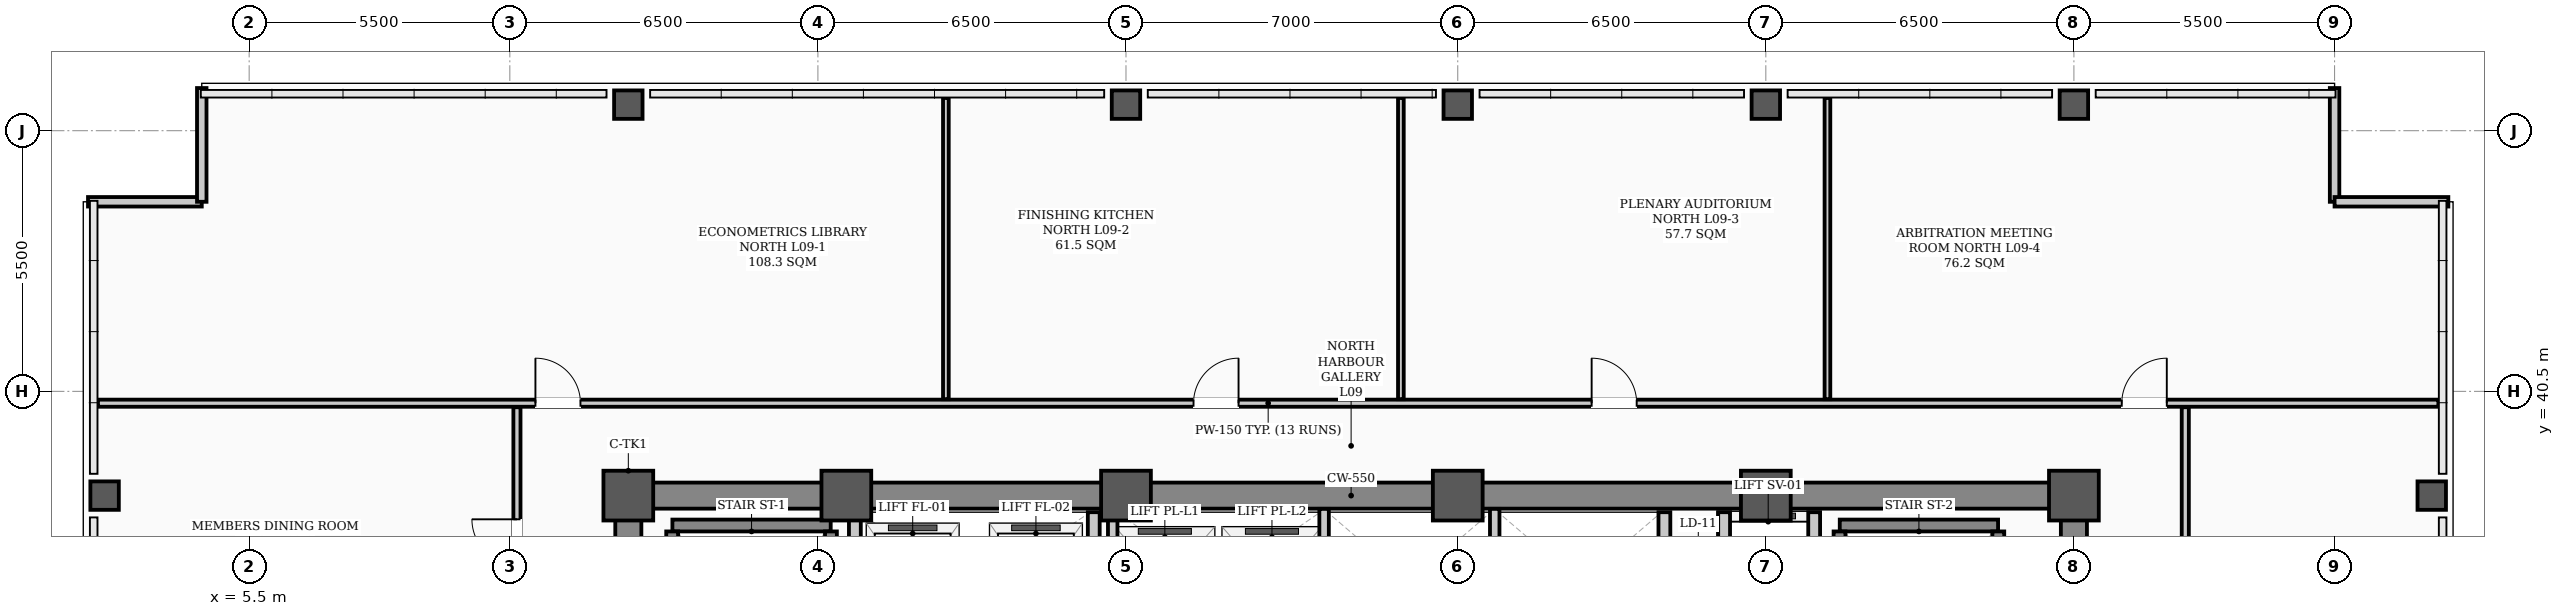
"""IFC4 building model, lengths in metres.
Left out: names, types, materials, properties, quantities, classifications, styles, units other than length and angle.
Written with IfcOpenShell. Run it as: python <this file> out.ifc"""

import sys

from ifc_helpers import new_model, si_unit, direction, frame, frame_2d, origin, origin_2d, place, context, subcontext, project, spatial, rectangle, hollow_rectangle, extrude, element, fill, save


model = new_model("IFC4")
c1 = context("Model", 3, precision=1e-05, world=origin(), true_north=direction((0.0, 1.0)))
c2 = subcontext(c1, "Body", "Model", "MODEL_VIEW")
j1 = project(units=[si_unit("LENGTHUNIT", "METRE"), si_unit("PLANEANGLEUNIT", "RADIAN")], contexts=[c1])
p1 = place(None, origin())
s1 = spatial("IfcSite", under=j1, at=p1, CompositionType="ELEMENT")
p2 = place(p1, origin())
s2 = spatial("IfcBuilding", under=s1, at=p2, CompositionType="ELEMENT")
p3 = place(p2, frame((0.0, 0.0, 38.2)))
s3 = spatial("IfcBuildingStorey", under=s2, at=p3, CompositionType="ELEMENT", Elevation=38.2)
for number, where, z_axis, x_axis in (
    (1, (13.5, 38.3, 0.0), (0.0, 0.0, 1.0), (1.0, 0.0, 0.0)),
    (2, (18.1, 38.3, 0.0), (0.0, 0.0, 1.0), (1.0, 0.0, 0.0)),
    (3, (24.0, 38.3, 0.0), (0.0, 0.0, 1.0), (1.0, 0.0, 0.0)),
    (4, (31.0, 38.3, 0.0), (0.0, 0.0, 1.0), (1.0, 0.0, 0.0)),
    (5, (37.5, 38.3, 0.0), (0.0, 0.0, 1.0), (1.0, 0.0, 0.0)),
    (6, (44.0, 38.3, 0.0), (0.0, 0.0, 1.0), (1.0, 0.0, 0.0)),
):
    element("IfcColumn", number, at=place(p3, frame(where, z_axis=z_axis, x_axis=x_axis)), inside=s3, PredefinedType="COLUMN", context=c2, shape_type="SweptSolid", body=[
        extrude(hollow_rectangle(XDim=1.05, YDim=1.05, WallThickness=0.038, InnerFilletRadius=0.019, OuterFilletRadius=0.057, at=origin_2d()), origin(), (0.0, 0.0, 1.0), 3.9),
    ])
for number, where, z_axis, x_axis in (
    (7, (2.45, 38.3, 0.0), (0.0, 0.0, 1.0), (1.0, 0.0, 0.0)),
    (8, (13.5, 46.55, 0.0), (0.0, 0.0, 1.0), (1.0, 0.0, 0.0)),
    (9, (24.0, 46.55, 0.0), (0.0, 0.0, 1.0), (1.0, 0.0, 0.0)),
    (10, (31.0, 46.55, 0.0), (0.0, 0.0, 1.0), (1.0, 0.0, 0.0)),
    (11, (37.5, 46.55, 0.0), (0.0, 0.0, 1.0), (1.0, 0.0, 0.0)),
    (12, (44.0, 46.55, 0.0), (0.0, 0.0, 1.0), (1.0, 0.0, 0.0)),
    (13, (51.55, 38.3, 0.0), (0.0, 0.0, 1.0), (1.0, 0.0, 0.0)),
):
    element("IfcColumn", number, at=place(p3, frame(where, z_axis=z_axis, x_axis=x_axis)), inside=s3, PredefinedType="COLUMN", context=c2, shape_type="SweptSolid", body=[
        extrude(hollow_rectangle(XDim=0.6, YDim=0.6, WallThickness=0.026, InnerFilletRadius=0.013, OuterFilletRadius=0.039, at=origin_2d()), origin(), (0.0, 0.0, 1.0), 3.9),
    ])
for number, where, z_axis, x_axis in (
    (14, (2.1, 44.5, 0.0), (0.0, 0.0, 1.0), (1.0, 0.0, 0.0)),
    (15, (4.5, 44.5, 0.0), (0.0, 0.0, 1.0), (0.0, 1.0, 0.0)),
    (16, (49.5, 46.9, 0.0), (0.0, 0.0, 1.0), (0.0, -1.0, 0.0)),
    (17, (49.5, 44.5, 0.0), (0.0, 0.0, 1.0), (1.0, 0.0, 0.0)),
):
    element("IfcWall", number, at=place(p3, frame(where, z_axis=z_axis, x_axis=x_axis)), inside=s3, PredefinedType="PARAPET", context=c2, shape_type="SweptSolid", body=[
        extrude(rectangle(XDim=2.4, YDim=0.2, at=frame_2d((1.2, 0.0))), origin(), (0.0, 0.0, 1.0), 1.2),
    ])
p4 = place(p3, frame((13.5, 38.3, 0.0), z_axis=(0.0, 0.0, 1.0), x_axis=(1.0, 0.0, 0.0)))
e18 = element("IfcWall", 18, at=p4, inside=s3, PredefinedType="SHEAR", context=c2, shape_type="SweptSolid", body=[
    extrude(rectangle(XDim=30.5, YDim=0.55, at=frame_2d((15.25, 0.0))), origin(), (0.0, 0.0, 1.0), 3.72),
])
for number, where, z_axis, x_axis in (
    (19, (13.5, 29.35, 0.0), (0.0, 0.0, 1.0), (0.0, 1.0, 0.0)),
    (20, (44.0, 29.35, 0.0), (0.0, 0.0, 1.0), (0.0, 1.0, 0.0)),
):
    element("IfcWall", number, at=place(p3, frame(where, z_axis=z_axis, x_axis=x_axis)), inside=s3, PredefinedType="SHEAR", context=c2, shape_type="SweptSolid", body=[
        extrude(rectangle(XDim=8.6, YDim=0.55, at=frame_2d((4.3, 0.0))), origin(), (0.0, 0.0, 1.0), 3.72),
    ])
p5 = place(p3, frame((14.43, 37.669, 0.0), z_axis=(0.0, 0.0, 1.0), x_axis=(1.0, 0.0, 0.0)))
e21 = element("IfcWall", 21, at=p5, inside=s3, PredefinedType="STANDARD", context=c2, shape_type="SweptSolid", body=[
    extrude(rectangle(XDim=3.34, YDim=0.25, at=frame_2d((1.67, 0.0))), origin(), (0.0, 0.0, 1.0), 3.72),
])
for number, where, z_axis, x_axis in (
    (22, (14.425, 30.36, 0.0), (0.0, 0.0, 1.0), (0.0, 1.0, 0.0)),
    (23, (17.775, 30.36, 0.0), (0.0, 0.0, 1.0), (0.0, 1.0, 0.0)),
):
    element("IfcWall", number, at=place(p3, frame(where, z_axis=z_axis, x_axis=x_axis)), inside=s3, PredefinedType="STANDARD", context=c2, shape_type="SweptSolid", body=[
        extrude(rectangle(XDim=7.184, YDim=0.25, at=frame_2d((3.592, 0.0))), origin(), (0.0, 0.0, 1.0), 3.72),
    ])
p6 = place(p3, frame((39.06, 37.669, 0.0), z_axis=(0.0, 0.0, 1.0), x_axis=(1.0, 0.0, 0.0)))
e24 = element("IfcWall", 24, at=p6, inside=s3, PredefinedType="STANDARD", context=c2, shape_type="SweptSolid", body=[
    extrude(rectangle(XDim=3.34, YDim=0.25, at=frame_2d((1.67, 0.0))), origin(), (0.0, 0.0, 1.0), 3.72),
])
for number, where, z_axis, x_axis in (
    (25, (39.055, 30.36, 0.0), (0.0, 0.0, 1.0), (0.0, 1.0, 0.0)),
    (26, (42.405, 30.36, 0.0), (0.0, 0.0, 1.0), (0.0, 1.0, 0.0)),
):
    element("IfcWall", number, at=place(p3, frame(where, z_axis=z_axis, x_axis=x_axis)), inside=s3, PredefinedType="STANDARD", context=c2, shape_type="SweptSolid", body=[
        extrude(rectangle(XDim=7.184, YDim=0.25, at=frame_2d((3.592, 0.0))), origin(), (0.0, 0.0, 1.0), 3.72),
    ])
p7 = place(p3, frame((36.62, 31.95, 0.0), z_axis=(0.0, 0.0, 1.0), x_axis=(0.0, 1.0, 0.0)))
e27 = element("IfcWall", 27, at=p7, inside=s3, PredefinedType="STANDARD", context=c2, shape_type="SweptSolid", body=[
    extrude(rectangle(XDim=6.0, YDim=0.25, at=frame_2d((3.0, 0.0))), origin(), (0.0, 0.0, 1.0), 3.3),
])
p8 = place(p7, frame((0.9, 0.0, 0.0)))
e28 = element("IfcOpeningElement", 28, at=p8, cuts=e27, PredefinedType="OPENING", context=c2, shape_type="SweptSolid", body=[
    extrude(rectangle(XDim=1.1, YDim=2.08, at=frame_2d((0.55, 1.04))), frame((0.0, 0.135, 0.0), z_axis=(0.0, -1.0, 0.0), x_axis=(1.0, 0.0, 0.0)), (0.0, 0.0, 1.0), 0.27),
])
p9 = place(p7, frame((4.0, 0.0, 0.0)))
e29 = element("IfcOpeningElement", 29, at=p9, cuts=e27, PredefinedType="OPENING", context=c2, shape_type="SweptSolid", body=[
    extrude(rectangle(XDim=1.1, YDim=2.08, at=frame_2d((0.55, 1.04))), frame((0.0, 0.135, 0.0), z_axis=(0.0, -1.0, 0.0), x_axis=(1.0, 0.0, 0.0)), (0.0, 0.0, 1.0), 0.27),
])
p10 = place(p3, frame((38.52, 31.95, 0.0), z_axis=(0.0, 0.0, 1.0), x_axis=(0.0, 1.0, 0.0)))
e30 = element("IfcWall", 30, at=p10, inside=s3, PredefinedType="STANDARD", context=c2, shape_type="SweptSolid", body=[
    extrude(rectangle(XDim=6.0, YDim=0.25, at=frame_2d((3.0, 0.0))), origin(), (0.0, 0.0, 1.0), 3.3),
])
for number, where, z_axis, x_axis in (
    (31, (18.28, 34.62, 0.0), (0.0, 0.0, 1.0), (0.0, 1.0, 0.0)),
    (32, (23.32, 34.62, 0.0), (0.0, 0.0, 1.0), (0.0, 1.0, 0.0)),
):
    element("IfcWall", number, at=place(p3, frame(where, z_axis=z_axis, x_axis=x_axis)), inside=s3, PredefinedType="STANDARD", context=c2, shape_type="SweptSolid", body=[
        extrude(rectangle(XDim=3.33, YDim=0.25, at=frame_2d((1.665, 0.0))), origin(), (0.0, 0.0, 1.0), 3.3),
    ])
p11 = place(p3, frame((35.36, 34.9, 0.0), z_axis=(0.0, 0.0, 1.0), x_axis=(0.0, 1.0, 0.0)))
e33 = element("IfcWall", 33, at=p11, inside=s3, PredefinedType="STANDARD", context=c2, shape_type="SweptSolid", body=[
    extrude(rectangle(XDim=3.05, YDim=0.25, at=frame_2d((1.525, 0.0))), origin(), (0.0, 0.0, 1.0), 3.3),
])
p12 = place(p3, frame((2.31, 40.25, 0.0), z_axis=(0.0, 0.0, 1.0), x_axis=(1.0, 0.0, 0.0)))
e34 = element("IfcWall", 34, at=p12, inside=s3, PredefinedType="PARTITIONING", context=c2, shape_type="SweptSolid", body=[
    extrude(rectangle(XDim=49.38, YDim=0.15, at=frame_2d((24.69, 0.0))), origin(), (0.0, 0.0, 1.0), 3.1),
])
p13 = place(p12, frame((9.23, 0.0, 0.0)))
e35 = element("IfcOpeningElement", 35, at=p13, cuts=e34, PredefinedType="OPENING", context=c2, shape_type="SweptSolid", body=[
    extrude(rectangle(XDim=0.95, YDim=2.08, at=frame_2d((0.475, 1.04))), frame((0.0, 0.085, 0.0), z_axis=(0.0, -1.0, 0.0), x_axis=(1.0, 0.0, 0.0)), (0.0, 0.0, 1.0), 0.17),
])
p14 = place(p12, frame((23.115, 0.0, 0.0)))
e36 = element("IfcOpeningElement", 36, at=p14, cuts=e34, PredefinedType="OPENING", context=c2, shape_type="SweptSolid", body=[
    extrude(rectangle(XDim=0.95, YDim=2.08, at=frame_2d((0.475, 1.04))), frame((0.0, 0.085, 0.0), z_axis=(0.0, -1.0, 0.0), x_axis=(1.0, 0.0, 0.0)), (0.0, 0.0, 1.0), 0.17),
])
p15 = place(p12, frame((31.515, 0.0, 0.0)))
e37 = element("IfcOpeningElement", 37, at=p15, cuts=e34, PredefinedType="OPENING", context=c2, shape_type="SweptSolid", body=[
    extrude(rectangle(XDim=0.95, YDim=2.08, at=frame_2d((0.475, 1.04))), frame((0.0, 0.085, 0.0), z_axis=(0.0, -1.0, 0.0), x_axis=(1.0, 0.0, 0.0)), (0.0, 0.0, 1.0), 0.17),
])
p16 = place(p12, frame((42.7, 0.0, 0.0)))
e38 = element("IfcOpeningElement", 38, at=p16, cuts=e34, PredefinedType="OPENING", context=c2, shape_type="SweptSolid", body=[
    extrude(rectangle(XDim=0.95, YDim=2.08, at=frame_2d((0.475, 1.04))), frame((0.0, 0.085, 0.0), z_axis=(0.0, -1.0, 0.0), x_axis=(1.0, 0.0, 0.0)), (0.0, 0.0, 1.0), 0.17),
])
p17 = place(p3, frame((11.15, 17.635, 0.0), z_axis=(0.0, 0.0, 1.0), x_axis=(0.0, 1.0, 0.0)))
e39 = element("IfcWall", 39, at=p17, inside=s3, PredefinedType="PARTITIONING", context=c2, shape_type="SweptSolid", body=[
    extrude(rectangle(XDim=22.53, YDim=0.15, at=frame_2d((11.265, 0.0))), origin(), (0.0, 0.0, 1.0), 3.0),
])
p18 = place(p17, frame((4.565, 0.0, 0.0)))
e40 = element("IfcOpeningElement", 40, at=p18, cuts=e39, PredefinedType="OPENING", context=c2, shape_type="SweptSolid", body=[
    extrude(rectangle(XDim=0.95, YDim=2.08, at=frame_2d((0.475, 1.04))), frame((0.0, 0.085, 0.0), z_axis=(0.0, -1.0, 0.0), x_axis=(1.0, 0.0, 0.0)), (0.0, 0.0, 1.0), 0.17),
])
p19 = place(p17, frame((12.99, 0.0, 0.0)))
e41 = element("IfcOpeningElement", 41, at=p19, cuts=e39, PredefinedType="OPENING", context=c2, shape_type="SweptSolid", body=[
    extrude(rectangle(XDim=0.95, YDim=2.08, at=frame_2d((0.475, 1.04))), frame((0.0, 0.085, 0.0), z_axis=(0.0, -1.0, 0.0), x_axis=(1.0, 0.0, 0.0)), (0.0, 0.0, 1.0), 0.17),
])
p20 = place(p17, frame((19.215, 0.0, 0.0)))
e42 = element("IfcOpeningElement", 42, at=p20, cuts=e39, PredefinedType="OPENING", context=c2, shape_type="SweptSolid", body=[
    extrude(rectangle(XDim=0.95, YDim=2.08, at=frame_2d((0.475, 1.04))), frame((0.0, 0.085, 0.0), z_axis=(0.0, -1.0, 0.0), x_axis=(1.0, 0.0, 0.0)), (0.0, 0.0, 1.0), 0.17),
])
p21 = place(p3, frame((46.35, 17.635, 0.0), z_axis=(0.0, 0.0, 1.0), x_axis=(0.0, 1.0, 0.0)))
e43 = element("IfcWall", 43, at=p21, inside=s3, PredefinedType="PARTITIONING", context=c2, shape_type="SweptSolid", body=[
    extrude(rectangle(XDim=22.53, YDim=0.15, at=frame_2d((11.265, 0.0))), origin(), (0.0, 0.0, 1.0), 3.0),
])
p22 = place(p21, frame((5.415, 0.0, 0.0)))
e44 = element("IfcOpeningElement", 44, at=p22, cuts=e43, PredefinedType="OPENING", context=c2, shape_type="SweptSolid", body=[
    extrude(rectangle(XDim=0.95, YDim=2.08, at=frame_2d((0.475, 1.04))), frame((0.0, 0.085, 0.0), z_axis=(0.0, -1.0, 0.0), x_axis=(1.0, 0.0, 0.0)), (0.0, 0.0, 1.0), 0.17),
])
p23 = place(p21, frame((16.765, 0.0, 0.0)))
e45 = element("IfcOpeningElement", 45, at=p23, cuts=e43, PredefinedType="OPENING", context=c2, shape_type="SweptSolid", body=[
    extrude(rectangle(XDim=0.95, YDim=2.08, at=frame_2d((0.475, 1.04))), frame((0.0, 0.085, 0.0), z_axis=(0.0, -1.0, 0.0), x_axis=(1.0, 0.0, 0.0)), (0.0, 0.0, 1.0), 0.17),
])
for number, where, z_axis, x_axis in (
    (46, (20.2, 40.335, 0.0), (0.0, 0.0, 1.0), (0.0, 1.0, 0.0)),
    (47, (29.8, 40.335, 0.0), (0.0, 0.0, 1.0), (0.0, 1.0, 0.0)),
    (48, (38.8, 40.335, 0.0), (0.0, 0.0, 1.0), (0.0, 1.0, 0.0)),
):
    element("IfcWall", number, at=place(p3, frame(where, z_axis=z_axis, x_axis=x_axis)), inside=s3, PredefinedType="PARTITIONING", context=c2, shape_type="SweptSolid", body=[
        extrude(rectangle(XDim=6.355, YDim=0.12, at=frame_2d((3.177, 0.0))), origin(), (0.0, 0.0, 1.0), 3.212),
    ])
p24 = place(p3, frame((23.72, 34.9, 0.0), z_axis=(0.0, 0.0, 1.0), x_axis=(0.0, 1.0, 0.0)))
e49 = element("IfcWall", 49, at=p24, inside=s3, PredefinedType="STANDARD", context=c2, shape_type="SweptSolid", body=[
    extrude(rectangle(XDim=3.12, YDim=0.2, at=frame_2d((1.56, 0.0))), origin(), (0.0, 0.0, 1.0), 3.1),
])
for number, where, z_axis, x_axis in (
    (50, (28.18, 34.9, 0.0), (0.0, 0.0, 1.0), (0.0, 1.0, 0.0)),
    (51, (31.78, 34.9, 0.0), (0.0, 0.0, 1.0), (0.0, 1.0, 0.0)),
):
    element("IfcWall", number, at=place(p3, frame(where, z_axis=z_axis, x_axis=x_axis)), inside=s3, PredefinedType="STANDARD", context=c2, shape_type="SweptSolid", body=[
        extrude(rectangle(XDim=3.12, YDim=0.2, at=frame_2d((1.56, 0.0))), origin(), (0.0, 0.0, 1.0), 3.3),
    ])
p25 = place(p20, origin())
e52 = element("IfcDoor", 52, at=p25, inside=s3, OperationType="SINGLE_SWING_RIGHT", PredefinedType="DOOR", context=c2, shape_type="SweptSolid", body=[
    extrude(rectangle(XDim=0.95, YDim=2.08, at=frame_2d((0.475, 1.04))), frame((0.0, 0.025, 0.0), z_axis=(0.0, -1.0, 0.0), x_axis=(1.0, 0.0, 0.0)), (0.0, 0.0, 1.0), 0.05),
])
fill(e42, e52)
p26 = place(p13, origin())
e53 = element("IfcDoor", 53, at=p26, inside=s3, OperationType="SINGLE_SWING_LEFT", PredefinedType="DOOR", context=c2, shape_type="SweptSolid", body=[
    extrude(rectangle(XDim=0.95, YDim=2.08, at=frame_2d((0.475, 1.04))), frame((0.0, 0.025, 0.0), z_axis=(0.0, -1.0, 0.0), x_axis=(1.0, 0.0, 0.0)), (0.0, 0.0, 1.0), 0.05),
])
fill(e35, e53)
p27 = place(p14, origin())
e54 = element("IfcDoor", 54, at=p27, inside=s3, OperationType="SINGLE_SWING_RIGHT", PredefinedType="DOOR", context=c2, shape_type="SweptSolid", body=[
    extrude(rectangle(XDim=0.95, YDim=2.08, at=frame_2d((0.475, 1.04))), frame((0.0, 0.025, 0.0), z_axis=(0.0, -1.0, 0.0), x_axis=(1.0, 0.0, 0.0)), (0.0, 0.0, 1.0), 0.05),
])
fill(e36, e54)
p28 = place(p15, origin())
e55 = element("IfcDoor", 55, at=p28, inside=s3, OperationType="SINGLE_SWING_LEFT", PredefinedType="DOOR", context=c2, shape_type="SweptSolid", body=[
    extrude(rectangle(XDim=0.95, YDim=2.08, at=frame_2d((0.475, 1.04))), frame((0.0, 0.025, 0.0), z_axis=(0.0, -1.0, 0.0), x_axis=(1.0, 0.0, 0.0)), (0.0, 0.0, 1.0), 0.05),
])
fill(e37, e55)
p29 = place(p16, origin())
e56 = element("IfcDoor", 56, at=p29, inside=s3, OperationType="SINGLE_SWING_RIGHT", PredefinedType="DOOR", context=c2, shape_type="SweptSolid", body=[
    extrude(rectangle(XDim=0.95, YDim=2.08, at=frame_2d((0.475, 1.04))), frame((0.0, 0.025, 0.0), z_axis=(0.0, -1.0, 0.0), x_axis=(1.0, 0.0, 0.0)), (0.0, 0.0, 1.0), 0.05),
])
fill(e38, e56)
save(model, sys.argv[1])
